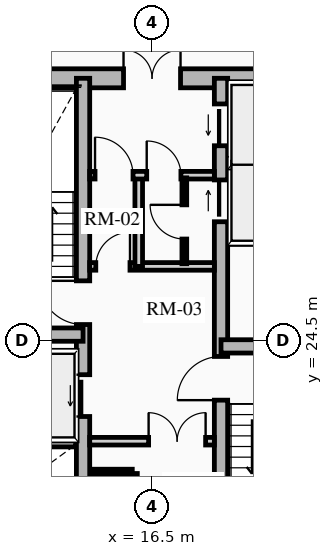
"""IFC4 building model, lengths in metres.
Left out: names, types, materials, properties, quantities, classifications, styles, units other than length and angle.
Written with IfcOpenShell. Run it as: python <this file> out.ifc"""

import sys

from ifc_helpers import new_model, si_unit, direction, frame, frame_2d, origin, place, context, subcontext, project, spatial, rectangle, extrude, source, transform, mapped, element, fill, save


model = new_model("IFC4")
c1 = context("Model", 3, precision=1e-05, world=origin(), true_north=direction((0.0, 1.0)))
c2 = subcontext(c1, "Body", "Model", "MODEL_VIEW")
j1 = project(units=[si_unit("LENGTHUNIT", "METRE"), si_unit("PLANEANGLEUNIT", "RADIAN")], contexts=[c1])
p1 = place(None, origin())
s1 = spatial("IfcSite", under=j1, at=p1, CompositionType="ELEMENT")
p2 = place(p1, origin())
s2 = spatial("IfcBuilding", under=s1, at=p2, CompositionType="ELEMENT")
p3 = place(p2, frame((0.0, 0.0, 30.73)))
s3 = spatial("IfcBuildingStorey", under=s2, at=p3, CompositionType="ELEMENT", Elevation=30.73)
p4 = place(p3, frame((11.15, 31.4, 0.0), z_axis=(0.0, 0.0, 1.0), x_axis=(1.0, 0.0, 0.0)))
e1 = element("IfcWall", 1, at=p4, inside=s3, PredefinedType="SHEAR", context=c2, shape_type="SweptSolid", body=[
    extrude(rectangle(XDim=10.7, YDim=0.5, at=frame_2d((5.35, 0.0))), origin(), (0.0, 0.0, 1.0), 2.91),
])
m1 = source(origin(), c2, "Body", "SweptSolid", [
    extrude(rectangle(XDim=1.5, YDim=2.02, at=frame_2d((0.75, 1.01))), frame((0.0, 0.26, 0.0), z_axis=(0.0, -1.0, 0.0), x_axis=(1.0, 0.0, 0.0)), (0.0, 0.0, 1.0), 0.52),
])
p5 = place(p4, frame((4.6, 0.0, 0.0)))
e2 = element("IfcOpeningElement", 2, at=p5, cuts=e1, PredefinedType="OPENING", context=c2, shape_type="MappedRepresentation", body=[
    mapped(m1, transform((0.0, 0.0, 0.0), x_axis=(1.0, 0.0, 0.0), y_axis=(0.0, 1.0, 0.0), z_axis=(0.0, 0.0, 1.0), scale=1.0)),
])
p6 = place(p3, frame((14.685, 17.6, 0.0), z_axis=(0.0, 0.0, 1.0), x_axis=(0.0, 1.0, 0.0)))
e3 = element("IfcWall", 3, at=p6, inside=s3, PredefinedType="SHEAR", context=c2, shape_type="SweptSolid", body=[
    extrude(rectangle(XDim=13.8, YDim=0.35, at=frame_2d((6.9, 0.0))), origin(), (0.0, 0.0, 1.0), 2.91),
])
m2 = source(origin(), c2, "Body", "SweptSolid", [
    extrude(rectangle(XDim=1.1, YDim=2.015, at=frame_2d((0.55, 1.007))), frame((0.0, 0.185, 0.0), z_axis=(0.0, -1.0, 0.0), x_axis=(1.0, 0.0, 0.0)), (0.0, 0.0, 1.0), 0.37),
])
p7 = place(p6, frame((4.9, 0.0, 0.0)))
e4 = element("IfcOpeningElement", 4, at=p7, cuts=e3, PredefinedType="OPENING", context=c2, shape_type="MappedRepresentation", body=[
    mapped(m2, transform((0.0, 0.0, 0.0), x_axis=(1.0, 0.0, 0.0), y_axis=(0.0, 1.0, 0.0), z_axis=(0.0, 0.0, 1.0), scale=1.0)),
])
m3 = source(origin(), c2, "Body", "SweptSolid", [
    extrude(rectangle(XDim=1.15, YDim=2.02, at=frame_2d((0.575, 1.01))), frame((0.0, 0.185, 0.0), z_axis=(0.0, -1.0, 0.0), x_axis=(1.0, 0.0, 0.0)), (0.0, 0.0, 1.0), 0.37),
])
p8 = place(p6, frame((7.32, 0.0, 0.0)))
e5 = element("IfcOpeningElement", 5, at=p8, cuts=e3, PredefinedType="OPENING", context=c2, shape_type="MappedRepresentation", body=[
    mapped(m3, transform((0.0, 0.0, 0.0), x_axis=(1.0, 0.0, 0.0), y_axis=(0.0, 1.0, 0.0), z_axis=(0.0, 0.0, 1.0), scale=1.0)),
])
p9 = place(p3, frame((18.315, 17.6, 0.0), z_axis=(0.0, 0.0, 1.0), x_axis=(0.0, 1.0, 0.0)))
e6 = element("IfcWall", 6, at=p9, inside=s3, PredefinedType="SHEAR", context=c2, shape_type="SweptSolid", body=[
    extrude(rectangle(XDim=13.8, YDim=0.35, at=frame_2d((6.9, 0.0))), origin(), (0.0, 0.0, 1.0), 2.91),
])
p10 = place(p9, frame((10.025, 0.0, 0.0)))
e7 = element("IfcOpeningElement", 7, at=p10, cuts=e6, PredefinedType="OPENING", context=c2, shape_type="MappedRepresentation", body=[
    mapped(m2, transform((0.0, 0.0, 0.0), x_axis=(1.0, 0.0, 0.0), y_axis=(0.0, 1.0, 0.0), z_axis=(0.0, 0.0, 1.0), scale=1.0)),
])
p11 = place(p9, frame((12.025, 0.0, 0.0)))
e8 = element("IfcOpeningElement", 8, at=p11, cuts=e6, PredefinedType="OPENING", context=c2, shape_type="MappedRepresentation", body=[
    mapped(m2, transform((0.0, 0.0, 0.0), x_axis=(1.0, 0.0, 0.0), y_axis=(0.0, 1.0, 0.0), z_axis=(0.0, 0.0, 1.0), scale=1.0)),
])
p12 = place(p9, frame((5.33, 0.0, 0.0)))
e9 = element("IfcOpeningElement", 9, at=p12, cuts=e6, PredefinedType="OPENING", context=c2, shape_type="MappedRepresentation", body=[
    mapped(m3, transform((0.0, 0.0, 0.0), x_axis=(1.0, 0.0, 0.0), y_axis=(0.0, 1.0, 0.0), z_axis=(0.0, 0.0, 1.0), scale=1.0)),
])
for number, where, z_axis, x_axis in (
    (10, (11.4, 24.655, 0.0), (0.0, 0.0, 1.0), (1.0, 0.0, 0.0)),
    (11, (18.315, 24.345, 0.0), (0.0, 0.0, 1.0), (1.0, 0.0, 0.0)),
):
    element("IfcWall", number, at=place(p3, frame(where, z_axis=z_axis, x_axis=x_axis)), inside=s3, PredefinedType="SHEAR", context=c2, shape_type="SweptSolid", body=[
        extrude(rectangle(XDim=3.285, YDim=0.35, at=frame_2d((1.643, 0.0))), origin(), (0.0, 0.0, 1.0), 2.91),
    ])
for number, where, z_axis, x_axis in (
    (12, (11.52, 21.8, 0.0), (0.0, 0.0, 1.0), (1.0, 0.0, 0.0)),
    (13, (18.51, 27.13, 0.0), (0.0, 0.0, 1.0), (1.0, 0.0, 0.0)),
    (14, (18.51, 29.175, 0.0), (0.0, 0.0, 1.0), (1.0, 0.0, 0.0)),
):
    element("IfcWall", number, at=place(p3, frame(where, z_axis=z_axis, x_axis=x_axis)), inside=s3, PredefinedType="SHEAR", context=c2, shape_type="SweptSolid", body=[
        extrude(rectangle(XDim=2.97, YDim=0.2, at=frame_2d((1.485, 0.0))), origin(), (0.0, 0.0, 1.0), 2.91),
    ])
p13 = place(p3, frame((14.86, 21.85, 0.0), z_axis=(0.0, 0.0, 1.0), x_axis=(1.0, 0.0, 0.0)))
e15 = element("IfcWall", 15, at=p13, inside=s3, PredefinedType="PARTITIONING", context=c2, shape_type="SweptSolid", body=[
    extrude(rectangle(XDim=3.28, YDim=0.2, at=frame_2d((1.64, 0.0))), origin(), (0.0, 0.0, 1.0), 2.635),
])
m4 = source(origin(), c2, "Body", "SweptSolid", [
    extrude(rectangle(XDim=1.5, YDim=2.02, at=frame_2d((0.75, 1.01))), frame((0.0, 0.11, 0.0), z_axis=(0.0, -1.0, 0.0), x_axis=(1.0, 0.0, 0.0)), (0.0, 0.0, 1.0), 0.22),
])
p14 = place(p13, frame((1.55, 0.0, 0.0)))
e16 = element("IfcOpeningElement", 16, at=p14, cuts=e15, PredefinedType="OPENING", context=c2, shape_type="MappedRepresentation", body=[
    mapped(m4, transform((0.0, 0.0, 0.0), x_axis=(1.0, 0.0, 0.0), y_axis=(0.0, 1.0, 0.0), z_axis=(0.0, 0.0, 1.0), scale=1.0)),
])
p15 = place(p3, frame((14.86, 26.45, 0.0), z_axis=(0.0, 0.0, 1.0), x_axis=(1.0, 0.0, 0.0)))
e17 = element("IfcWall", 17, at=p15, inside=s3, PredefinedType="PARTITIONING", context=c2, shape_type="SweptSolid", body=[
    extrude(rectangle(XDim=3.28, YDim=0.2, at=frame_2d((1.64, 0.0))), origin(), (0.0, 0.0, 1.0), 2.635),
])
m5 = source(origin(), c2, "Body", "SweptSolid", [
    extrude(rectangle(XDim=0.9, YDim=2.005, at=frame_2d((0.45, 1.002))), frame((0.0, 0.11, 0.0), z_axis=(0.0, -1.0, 0.0), x_axis=(1.0, 0.0, 0.0)), (0.0, 0.0, 1.0), 0.22),
])
p16 = place(p15, frame((0.16, 0.0, 0.0)))
e18 = element("IfcOpeningElement", 18, at=p16, cuts=e17, PredefinedType="OPENING", context=c2, shape_type="MappedRepresentation", body=[
    mapped(m5, transform((0.0, 0.0, 0.0), x_axis=(1.0, 0.0, 0.0), y_axis=(0.0, 1.0, 0.0), z_axis=(0.0, 0.0, 1.0), scale=1.0)),
])
p17 = place(p3, frame((16.15, 26.45, 0.0), z_axis=(0.0, 0.0, 1.0), x_axis=(0.0, 1.0, 0.0)))
e19 = element("IfcWall", 19, at=p17, inside=s3, PredefinedType="PARTITIONING", context=c2, shape_type="SweptSolid", body=[
    extrude(rectangle(XDim=2.4, YDim=0.2, at=frame_2d((1.2, 0.0))), origin(), (0.0, 0.0, 1.0), 2.635),
])
p18 = place(p3, frame((14.86, 28.85, 0.0), z_axis=(0.0, 0.0, 1.0), x_axis=(1.0, 0.0, 0.0)))
e20 = element("IfcWall", 20, at=p18, inside=s3, PredefinedType="PARTITIONING", context=c2, shape_type="SweptSolid", body=[
    extrude(rectangle(XDim=3.28, YDim=0.2, at=frame_2d((1.64, 0.0))), origin(), (0.0, 0.0, 1.0), 2.635),
])
m6 = source(origin(), c2, "Body", "SweptSolid", [
    extrude(rectangle(XDim=1.0, YDim=2.015, at=frame_2d((0.5, 1.007))), frame((0.0, 0.11, 0.0), z_axis=(0.0, -1.0, 0.0), x_axis=(1.0, 0.0, 0.0)), (0.0, 0.0, 1.0), 0.22),
])
p19 = place(p18, frame((0.14, 0.0, 0.0)))
e21 = element("IfcOpeningElement", 21, at=p19, cuts=e20, PredefinedType="OPENING", context=c2, shape_type="MappedRepresentation", body=[
    mapped(m6, transform((0.0, 0.0, 0.0), x_axis=(1.0, 0.0, 0.0), y_axis=(0.0, 1.0, 0.0), z_axis=(0.0, 0.0, 1.0), scale=1.0)),
])
p20 = place(p18, frame((1.5, 0.0, 0.0)))
e22 = element("IfcOpeningElement", 22, at=p20, cuts=e20, PredefinedType="OPENING", context=c2, shape_type="MappedRepresentation", body=[
    mapped(m5, transform((0.0, 0.0, 0.0), x_axis=(1.0, 0.0, 0.0), y_axis=(0.0, 1.0, 0.0), z_axis=(0.0, 0.0, 1.0), scale=1.0)),
])
p21 = place(p3, frame((16.05, 17.92, 0.0), z_axis=(0.0, 0.0, 1.0), x_axis=(0.0, 1.0, 0.0)))
e23 = element("IfcWall", 23, at=p21, inside=s3, PredefinedType="PARTITIONING", context=c2, shape_type="SweptSolid", body=[
    extrude(rectangle(XDim=3.08, YDim=0.125, at=frame_2d((1.54, 0.0))), origin(), (0.0, 0.0, 1.0), 2.635),
])
m7 = source(origin(), c2, "Body", "SweptSolid", [
    extrude(rectangle(XDim=0.9, YDim=2.005, at=frame_2d((0.45, 1.002))), frame((0.0, 0.073, 0.0), z_axis=(0.0, -1.0, 0.0), x_axis=(1.0, 0.0, 0.0)), (0.0, 0.0, 1.0), 0.145),
])
p22 = place(p21, frame((1.05, 0.0, 0.0)))
e24 = element("IfcOpeningElement", 24, at=p22, cuts=e23, PredefinedType="OPENING", context=c2, shape_type="MappedRepresentation", body=[
    mapped(m7, transform((0.0, 0.0, 0.0), x_axis=(1.0, 0.0, 0.0), y_axis=(0.0, 1.0, 0.0), z_axis=(0.0, 0.0, 1.0), scale=1.0)),
])
p23 = place(p3, frame((14.88, 21.05, 0.0), z_axis=(0.0, 0.0, 1.0), x_axis=(1.0, 0.0, 0.0)))
e25 = element("IfcWall", 25, at=p23, inside=s3, PredefinedType="PARTITIONING", context=c2, shape_type="SweptSolid", body=[
    extrude(rectangle(XDim=1.1, YDim=0.125, at=frame_2d((0.55, 0.0))), origin(), (0.0, 0.0, 1.0), 2.635),
])
p24 = place(p3, frame((17.35, 26.52, 0.0), z_axis=(0.0, 0.0, 1.0), x_axis=(0.0, 1.0, 0.0)))
e26 = element("IfcWall", 26, at=p24, inside=s3, PredefinedType="PARTITIONING", context=c2, shape_type="SweptSolid", body=[
    extrude(rectangle(XDim=2.26, YDim=0.125, at=frame_2d((1.13, 0.0))), origin(), (0.0, 0.0, 1.0), 2.635),
])
p25 = place(p24, frame((0.65, 0.0, 0.0)))
e27 = element("IfcOpeningElement", 27, at=p25, cuts=e26, PredefinedType="OPENING", context=c2, shape_type="MappedRepresentation", body=[
    mapped(m7, transform((0.0, 0.0, 0.0), x_axis=(1.0, 0.0, 0.0), y_axis=(0.0, 1.0, 0.0), z_axis=(0.0, 0.0, 1.0), scale=1.0)),
])
m8 = source(origin(), c2, "Body", "SweptSolid", [
    extrude(rectangle(XDim=1.1, YDim=2.015, at=frame_2d((0.55, 1.007))), frame((0.0, 0.025, 0.0), z_axis=(0.0, -1.0, 0.0), x_axis=(1.0, 0.0, 0.0)), (0.0, 0.0, 1.0), 0.05),
])
p26 = place(p7, origin())
e28 = element("IfcDoor", 28, at=p26, inside=s3, OperationType="SLIDING_TO_LEFT", PredefinedType="DOOR", context=c2, shape_type="MappedRepresentation", body=[
    mapped(m8, transform((0.0, 0.0, 0.0), x_axis=(1.0, 0.0, 0.0), y_axis=(0.0, 1.0, 0.0), z_axis=(0.0, 0.0, 1.0), scale=1.0)),
])
fill(e4, e28)
p27 = place(p10, origin())
e29 = element("IfcDoor", 29, at=p27, inside=s3, OperationType="SLIDING_TO_RIGHT", PredefinedType="DOOR", context=c2, shape_type="MappedRepresentation", body=[
    mapped(m8, transform((0.0, 0.0, 0.0), x_axis=(1.0, 0.0, 0.0), y_axis=(0.0, 1.0, 0.0), z_axis=(0.0, 0.0, 1.0), scale=1.0)),
])
fill(e7, e29)
p28 = place(p11, origin())
e30 = element("IfcDoor", 30, at=p28, inside=s3, OperationType="SLIDING_TO_LEFT", PredefinedType="DOOR", context=c2, shape_type="MappedRepresentation", body=[
    mapped(m8, transform((0.0, 0.0, 0.0), x_axis=(1.0, 0.0, 0.0), y_axis=(0.0, 1.0, 0.0), z_axis=(0.0, 0.0, 1.0), scale=1.0)),
])
fill(e8, e30)
m9 = source(origin(), c2, "Body", "SweptSolid", [
    extrude(rectangle(XDim=1.15, YDim=2.02, at=frame_2d((0.575, 1.01))), frame((0.0, 0.025, 0.0), z_axis=(0.0, -1.0, 0.0), x_axis=(1.0, 0.0, 0.0)), (0.0, 0.0, 1.0), 0.05),
])
p29 = place(p8, origin())
e31 = element("IfcDoor", 31, at=p29, inside=s3, OperationType="SINGLE_SWING_RIGHT", PredefinedType="DOOR", context=c2, shape_type="MappedRepresentation", body=[
    mapped(m9, transform((0.0, 0.0, 0.0), x_axis=(1.0, 0.0, 0.0), y_axis=(0.0, 1.0, 0.0), z_axis=(0.0, 0.0, 1.0), scale=1.0)),
])
fill(e5, e31)
p30 = place(p12, origin())
e32 = element("IfcDoor", 32, at=p30, inside=s3, OperationType="SINGLE_SWING_LEFT", PredefinedType="DOOR", context=c2, shape_type="MappedRepresentation", body=[
    mapped(m9, transform((0.0, 0.0, 0.0), x_axis=(1.0, 0.0, 0.0), y_axis=(0.0, 1.0, 0.0), z_axis=(0.0, 0.0, 1.0), scale=1.0)),
])
fill(e9, e32)
m10 = source(origin(), c2, "Body", "SweptSolid", [
    extrude(rectangle(XDim=1.5, YDim=2.02, at=frame_2d((0.75, 1.01))), frame((0.0, 0.025, 0.0), z_axis=(0.0, -1.0, 0.0), x_axis=(1.0, 0.0, 0.0)), (0.0, 0.0, 1.0), 0.05),
])
p31 = place(p5, origin())
e33 = element("IfcDoor", 33, at=p31, inside=s3, OperationType="DOUBLE_DOOR_SINGLE_SWING", PredefinedType="DOOR", context=c2, shape_type="MappedRepresentation", body=[
    mapped(m10, transform((0.0, 0.0, 0.0), x_axis=(1.0, 0.0, 0.0), y_axis=(0.0, 1.0, 0.0), z_axis=(0.0, 0.0, 1.0), scale=1.0)),
])
fill(e2, e33)
p32 = place(p14, origin())
e34 = element("IfcDoor", 34, at=p32, inside=s3, OperationType="DOUBLE_DOOR_SINGLE_SWING", PredefinedType="DOOR", context=c2, shape_type="MappedRepresentation", body=[
    mapped(m10, transform((0.0, 0.0, 0.0), x_axis=(1.0, 0.0, 0.0), y_axis=(0.0, 1.0, 0.0), z_axis=(0.0, 0.0, 1.0), scale=1.0)),
])
fill(e16, e34)
m11 = source(origin(), c2, "Body", "SweptSolid", [
    extrude(rectangle(XDim=0.9, YDim=2.005, at=frame_2d((0.45, 1.002))), frame((0.0, 0.025, 0.0), z_axis=(0.0, -1.0, 0.0), x_axis=(1.0, 0.0, 0.0)), (0.0, 0.0, 1.0), 0.05),
])
p33 = place(p16, origin())
e35 = element("IfcDoor", 35, at=p33, inside=s3, OperationType="SINGLE_SWING_RIGHT", PredefinedType="DOOR", context=c2, shape_type="MappedRepresentation", body=[
    mapped(m11, transform((0.0, 0.0, 0.0), x_axis=(1.0, 0.0, 0.0), y_axis=(0.0, 1.0, 0.0), z_axis=(0.0, 0.0, 1.0), scale=1.0)),
])
fill(e18, e35)
m12 = source(origin(), c2, "Body", "SweptSolid", [
    extrude(rectangle(XDim=1.0, YDim=2.015, at=frame_2d((0.5, 1.007))), frame((0.0, 0.025, 0.0), z_axis=(0.0, -1.0, 0.0), x_axis=(1.0, 0.0, 0.0)), (0.0, 0.0, 1.0), 0.05),
])
p34 = place(p19, origin())
e36 = element("IfcDoor", 36, at=p34, inside=s3, OperationType="SINGLE_SWING_LEFT", PredefinedType="DOOR", context=c2, shape_type="MappedRepresentation", body=[
    mapped(m12, transform((0.0, 0.0, 0.0), x_axis=(1.0, 0.0, 0.0), y_axis=(0.0, 1.0, 0.0), z_axis=(0.0, 0.0, 1.0), scale=1.0)),
])
fill(e21, e36)
p35 = place(p20, origin())
e37 = element("IfcDoor", 37, at=p35, inside=s3, OperationType="SINGLE_SWING_LEFT", PredefinedType="DOOR", context=c2, shape_type="MappedRepresentation", body=[
    mapped(m11, transform((0.0, 0.0, 0.0), x_axis=(1.0, 0.0, 0.0), y_axis=(0.0, 1.0, 0.0), z_axis=(0.0, 0.0, 1.0), scale=1.0)),
])
fill(e22, e37)
p36 = place(p25, origin())
e38 = element("IfcDoor", 38, at=p36, inside=s3, OperationType="SINGLE_SWING_RIGHT", PredefinedType="DOOR", context=c2, shape_type="MappedRepresentation", body=[
    mapped(m11, transform((0.0, 0.0, 0.0), x_axis=(1.0, 0.0, 0.0), y_axis=(0.0, 1.0, 0.0), z_axis=(0.0, 0.0, 1.0), scale=1.0)),
])
fill(e27, e38)
save(model, sys.argv[1])
